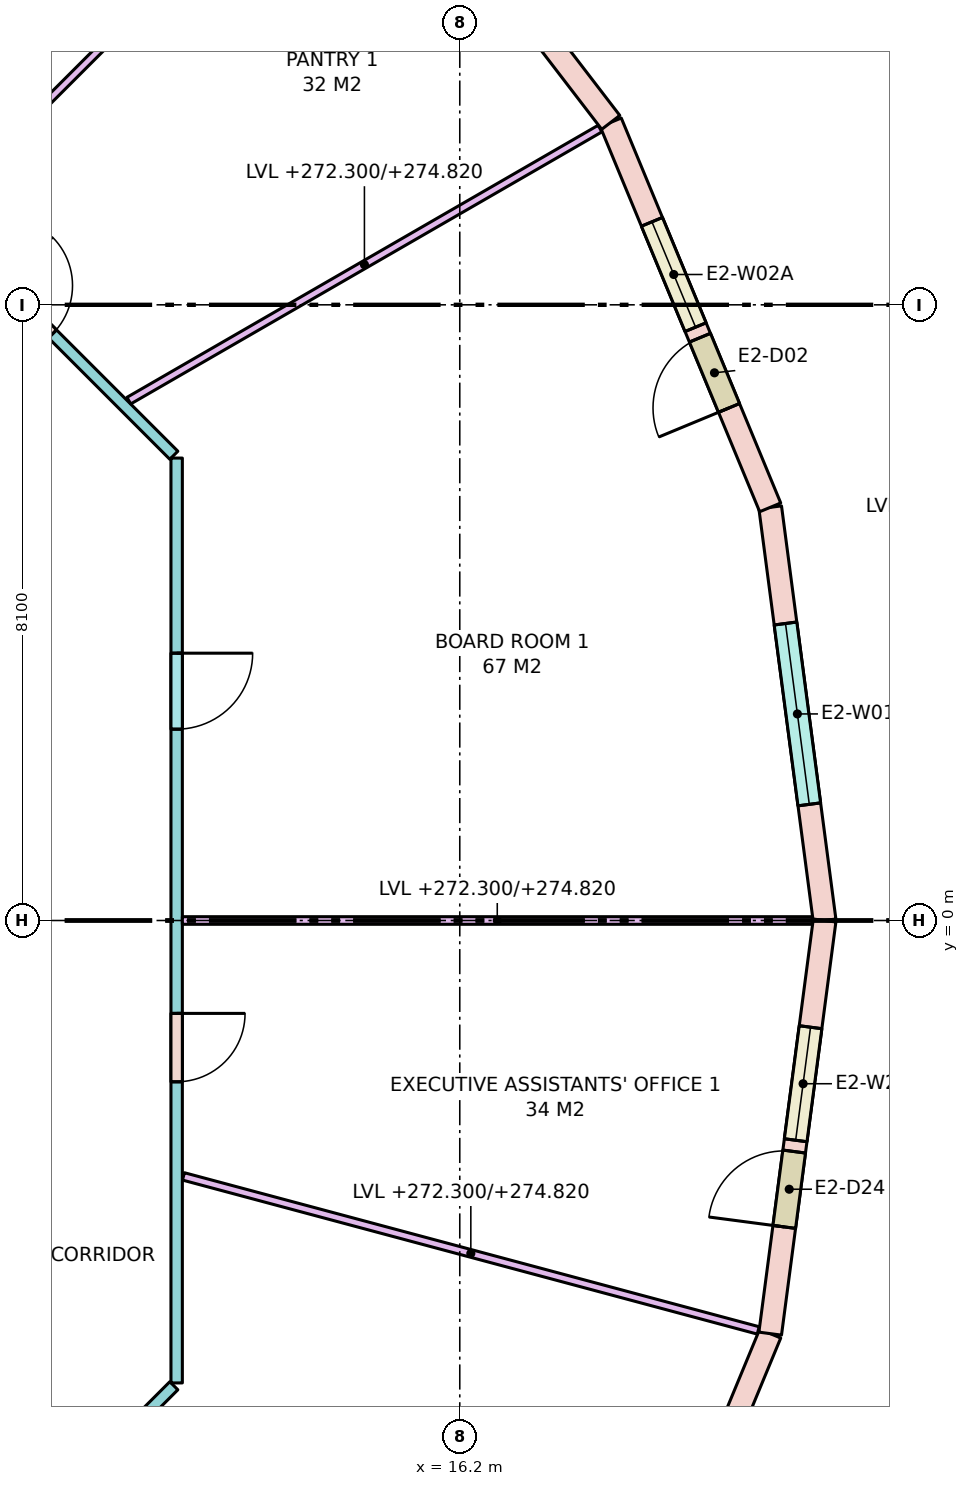
"""IFC4 building model, lengths in metres.
Left out: names, types, materials, properties, quantities, classifications, styles, units other than length and angle.
Written with IfcOpenShell. Run it as: python <this file> out.ifc"""

import sys

from ifc_helpers import new_model, si_unit, direction, frame, frame_2d, origin, place, context, subcontext, project, spatial, rectangle, extrude, element, fill, save


model = new_model("IFC4")
c1 = context("Model", 3, precision=1e-05, world=origin(), true_north=direction((0.0, 1.0)))
c2 = subcontext(c1, "Body", "Model", "MODEL_VIEW")
j1 = project(units=[si_unit("LENGTHUNIT", "METRE"), si_unit("PLANEANGLEUNIT", "RADIAN")], contexts=[c1])
p1 = place(None, origin())
s1 = spatial("IfcSite", under=j1, at=p1, CompositionType="ELEMENT")
p2 = place(p1, origin())
s2 = spatial("IfcBuilding", under=s1, at=p2, CompositionType="ELEMENT")
p3 = place(p2, frame((0.0, 0.0, 272.3)))
s3 = spatial("IfcBuildingStorey", under=s2, at=p3, CompositionType="ELEMENT", Elevation=272.3)
p4 = place(p3, frame((21.0, 0.0, 0.0), z_axis=(0.0, 0.0, 1.0), x_axis=(-0.130527087244, 0.991444743541, 0.0)))
e1 = element("IfcWall", 1, at=p4, inside=s3, PredefinedType="STANDARD", context=c2, shape_type="SweptSolid", body=[
    extrude(rectangle(XDim=5.482, YDim=0.3, at=frame_2d((2.741, 0.0))), origin(), (0.0, 0.0, 1.0), 3.42),
])
p5 = place(p4, frame((1.541, 0.0, 0.8)))
e2 = element("IfcOpeningElement", 2, at=p5, cuts=e1, PredefinedType="OPENING", context=c2, shape_type="SweptSolid", body=[
    extrude(rectangle(XDim=2.4, YDim=2.4, at=frame_2d((1.2, 1.2))), frame((0.0, 0.16, 0.0), z_axis=(0.0, -1.0, 0.0), x_axis=(1.0, 0.0, 0.0)), (0.0, 0.0, 1.0), 0.32),
])
p6 = place(p3, frame((20.284, 5.435, 0.0), z_axis=(0.0, 0.0, 1.0), x_axis=(-0.382688740813, 0.923877333662, 0.0)))
e3 = element("IfcWall", 3, at=p6, inside=s3, PredefinedType="STANDARD", context=c2, shape_type="SweptSolid", body=[
    extrude(rectangle(XDim=5.482, YDim=0.3, at=frame_2d((2.741, 0.0))), origin(), (0.0, 0.0, 1.0), 3.42),
])
p7 = place(p6, frame((1.416, 0.0, 0.0)))
e4 = element("IfcOpeningElement", 4, at=p7, cuts=e3, PredefinedType="OPENING", context=c2, shape_type="SweptSolid", body=[
    extrude(rectangle(XDim=1.0, YDim=2.4, at=frame_2d((0.5, 1.2))), frame((0.0, 0.16, 0.0), z_axis=(0.0, -1.0, 0.0), x_axis=(1.0, 0.0, 0.0)), (0.0, 0.0, 1.0), 0.32),
])
p8 = place(p6, frame((2.566, 0.0, 0.8)))
e5 = element("IfcOpeningElement", 5, at=p8, cuts=e3, PredefinedType="OPENING", context=c2, shape_type="SweptSolid", body=[
    extrude(rectangle(XDim=1.5, YDim=2.4, at=frame_2d((0.75, 1.2))), frame((0.0, 0.16, 0.0), z_axis=(0.0, -1.0, 0.0), x_axis=(1.0, 0.0, 0.0)), (0.0, 0.0, 1.0), 0.32),
])
p9 = place(p3, frame((18.187, 10.5, 0.0), z_axis=(0.0, 0.0, 1.0), x_axis=(-0.608784891166, 0.793335336593, 0.0)))
e6 = element("IfcWall", 6, at=p9, inside=s3, PredefinedType="STANDARD", context=c2, shape_type="SweptSolid", body=[
    extrude(rectangle(XDim=5.482, YDim=0.3, at=frame_2d((2.741, 0.0))), origin(), (0.0, 0.0, 1.0), 3.42),
])
p10 = place(p9, frame((1.541, 0.0, 0.8)))
e7 = element("IfcOpeningElement", 7, at=p10, cuts=e6, PredefinedType="OPENING", context=c2, shape_type="SweptSolid", body=[
    extrude(rectangle(XDim=2.4, YDim=2.4, at=frame_2d((1.2, 1.2))), frame((0.0, 0.16, 0.0), z_axis=(0.0, -1.0, 0.0), x_axis=(1.0, 0.0, 0.0)), (0.0, 0.0, 1.0), 0.32),
])
p11 = place(p3, frame((18.187, -10.5, 0.0), z_axis=(0.0, 0.0, 1.0), x_axis=(0.382688740813, 0.923877333662, 0.0)))
e8 = element("IfcWall", 8, at=p11, inside=s3, PredefinedType="STANDARD", context=c2, shape_type="SweptSolid", body=[
    extrude(rectangle(XDim=5.482, YDim=0.3, at=frame_2d((2.741, 0.0))), origin(), (0.0, 0.0, 1.0), 3.42),
])
p12 = place(p11, frame((1.541, 0.0, 0.8)))
e9 = element("IfcOpeningElement", 9, at=p12, cuts=e8, PredefinedType="OPENING", context=c2, shape_type="SweptSolid", body=[
    extrude(rectangle(XDim=2.4, YDim=2.4, at=frame_2d((1.2, 1.2))), frame((0.0, 0.16, 0.0), z_axis=(0.0, -1.0, 0.0), x_axis=(1.0, 0.0, 0.0)), (0.0, 0.0, 1.0), 0.32),
])
p13 = place(p3, frame((20.284, -5.435, 0.0), z_axis=(0.0, 0.0, 1.0), x_axis=(0.130527087244, 0.991444743541, 0.0)))
e10 = element("IfcWall", 10, at=p13, inside=s3, PredefinedType="STANDARD", context=c2, shape_type="SweptSolid", body=[
    extrude(rectangle(XDim=5.482, YDim=0.3, at=frame_2d((2.741, 0.0))), origin(), (0.0, 0.0, 1.0), 3.42),
])
p14 = place(p13, frame((1.416, 0.0, 0.0)))
e11 = element("IfcOpeningElement", 11, at=p14, cuts=e10, PredefinedType="OPENING", context=c2, shape_type="SweptSolid", body=[
    extrude(rectangle(XDim=1.0, YDim=2.4, at=frame_2d((0.5, 1.2))), frame((0.0, 0.16, 0.0), z_axis=(0.0, -1.0, 0.0), x_axis=(1.0, 0.0, 0.0)), (0.0, 0.0, 1.0), 0.32),
])
p15 = place(p13, frame((2.566, 0.0, 0.8)))
e12 = element("IfcOpeningElement", 12, at=p15, cuts=e10, PredefinedType="OPENING", context=c2, shape_type="SweptSolid", body=[
    extrude(rectangle(XDim=1.5, YDim=2.4, at=frame_2d((0.75, 1.2))), frame((0.0, 0.16, 0.0), z_axis=(0.0, -1.0, 0.0), x_axis=(1.0, 0.0, 0.0)), (0.0, 0.0, 1.0), 0.32),
])
p16 = place(p3, frame((12.438, -6.121, 0.0), z_axis=(0.0, 0.0, 1.0), x_axis=(-0.707106781187, -0.707106781187, 0.0)))
e13 = element("IfcWall", 13, at=p16, inside=s3, PredefinedType="PARTITIONING", context=c2, shape_type="SweptSolid", body=[
    extrude(rectangle(XDim=6.105, YDim=0.15, at=frame_2d((3.053, 0.0))), origin(), (0.0, 0.0, 1.0), 2.52),
])
p17 = place(p16, frame((1.758, 0.0, 0.0)))
e14 = element("IfcOpeningElement", 14, at=p17, cuts=e13, PredefinedType="OPENING", context=c2, shape_type="SweptSolid", body=[
    extrude(rectangle(XDim=1.0, YDim=2.1, at=frame_2d((0.5, 1.05))), frame((0.0, 0.085, 0.0), z_axis=(0.0, -1.0, 0.0), x_axis=(1.0, 0.0, 0.0)), (0.0, 0.0, 1.0), 0.17),
])
p18 = place(p3, frame((8.121, 10.438, 0.0), z_axis=(0.0, 0.0, 1.0), x_axis=(0.707106781187, -0.707106781187, 0.0)))
e15 = element("IfcWall", 15, at=p18, inside=s3, PredefinedType="PARTITIONING", context=c2, shape_type="SweptSolid", body=[
    extrude(rectangle(XDim=6.105, YDim=0.15, at=frame_2d((3.053, 0.0))), origin(), (0.0, 0.0, 1.0), 2.52),
])
p19 = place(p18, frame((2.948, 0.0, 0.0)))
e16 = element("IfcOpeningElement", 16, at=p19, cuts=e15, PredefinedType="OPENING", context=c2, shape_type="SweptSolid", body=[
    extrude(rectangle(XDim=0.9, YDim=2.1, at=frame_2d((0.45, 1.05))), frame((0.0, 0.085, 0.0), z_axis=(0.0, -1.0, 0.0), x_axis=(1.0, 0.0, 0.0)), (0.0, 0.0, 1.0), 0.17),
])
p20 = place(p3, frame((12.475, 6.084, 0.0), z_axis=(0.0, 0.0, 1.0), x_axis=(0.0, -1.0, 0.0)))
e17 = element("IfcWall", 17, at=p20, inside=s3, PredefinedType="PARTITIONING", context=c2, shape_type="SweptSolid", body=[
    extrude(rectangle(XDim=12.167, YDim=0.15, at=frame_2d((6.084, 0.0))), origin(), (0.0, 0.0, 1.0), 2.52),
])
p21 = place(p20, frame((7.306, 0.0, 0.0)))
e18 = element("IfcOpeningElement", 18, at=p21, cuts=e17, PredefinedType="OPENING", context=c2, shape_type="SweptSolid", body=[
    extrude(rectangle(XDim=0.9, YDim=2.1, at=frame_2d((0.45, 1.05))), frame((0.0, 0.085, 0.0), z_axis=(0.0, -1.0, 0.0), x_axis=(1.0, 0.0, 0.0)), (0.0, 0.0, 1.0), 0.17),
])
p22 = place(p20, frame((2.567, 0.0, 0.0)))
e19 = element("IfcOpeningElement", 19, at=p22, cuts=e17, PredefinedType="OPENING", context=c2, shape_type="SweptSolid", body=[
    extrude(rectangle(XDim=1.0, YDim=2.1, at=frame_2d((0.5, 1.05))), frame((0.0, 0.085, 0.0), z_axis=(0.0, -1.0, 0.0), x_axis=(1.0, 0.0, 0.0)), (0.0, 0.0, 1.0), 0.17),
])
p23 = place(p3, frame((12.55, 0.0, 0.0), z_axis=(0.0, 0.0, 1.0), x_axis=(1.0, 0.0, 0.0)))
e20 = element("IfcWall", 20, at=p23, inside=s3, PredefinedType="PARTITIONING", context=c2, shape_type="SweptSolid", body=[
    extrude(rectangle(XDim=8.287, YDim=0.1, at=frame_2d((4.143, 0.0))), origin(), (0.0, 0.0, 1.0), 2.52),
])
p24 = place(p3, frame((11.846, 6.839, 0.0), z_axis=(0.0, 0.0, 1.0), x_axis=(0.866011787705, 0.500023583, 0.0)))
e21 = element("IfcWall", 21, at=p24, inside=s3, PredefinedType="PARTITIONING", context=c2, shape_type="SweptSolid", body=[
    extrude(rectangle(XDim=7.158, YDim=0.1, at=frame_2d((3.579, 0.0))), origin(), (0.0, 0.0, 1.0), 2.52),
])
p25 = place(p3, frame((9.333, 9.333, 0.0), z_axis=(0.0, 0.0, 1.0), x_axis=(0.707106781187, 0.707106781187, 0.0)))
e22 = element("IfcWall", 22, at=p25, inside=s3, PredefinedType="PARTITIONING", context=c2, shape_type="SweptSolid", body=[
    extrude(rectangle(XDim=7.639, YDim=0.1, at=frame_2d((3.819, 0.0))), origin(), (0.0, 0.0, 1.0), 2.52),
])
p26 = place(p3, frame((12.564, -3.367, 0.0), z_axis=(0.0, 0.0, 1.0), x_axis=(0.965933576344, -0.258790119773, 0.0)))
e23 = element("IfcWall", 23, at=p26, inside=s3, PredefinedType="PARTITIONING", context=c2, shape_type="SweptSolid", body=[
    extrude(rectangle(XDim=7.829, YDim=0.1, at=frame_2d((3.915, 0.0))), origin(), (0.0, 0.0, 1.0), 2.52),
])
p27 = place(p5, origin())
e24 = element("IfcWindow", 24, at=p27, inside=s3, PartitioningType="SINGLE_PANEL", PredefinedType="WINDOW", context=c2, shape_type="SweptSolid", body=[
    extrude(rectangle(XDim=2.4, YDim=2.4, at=frame_2d((1.2, 1.2))), frame((0.0, 0.03, 0.0), z_axis=(0.0, -1.0, 0.0), x_axis=(1.0, 0.0, 0.0)), (0.0, 0.0, 1.0), 0.06),
])
fill(e2, e24)
p28 = place(p7, origin())
e25 = element("IfcDoor", 25, at=p28, inside=s3, OperationType="SINGLE_SWING_LEFT", PredefinedType="DOOR", context=c2, shape_type="SweptSolid", body=[
    extrude(rectangle(XDim=1.0, YDim=2.4, at=frame_2d((0.5, 1.2))), frame((0.0, 0.025, 0.0), z_axis=(0.0, -1.0, 0.0), x_axis=(1.0, 0.0, 0.0)), (0.0, 0.0, 1.0), 0.05),
])
fill(e4, e25)
p29 = place(p8, origin())
e26 = element("IfcWindow", 26, at=p29, inside=s3, PartitioningType="SINGLE_PANEL", PredefinedType="WINDOW", context=c2, shape_type="SweptSolid", body=[
    extrude(rectangle(XDim=1.5, YDim=2.4, at=frame_2d((0.75, 1.2))), frame((0.0, 0.03, 0.0), z_axis=(0.0, -1.0, 0.0), x_axis=(1.0, 0.0, 0.0)), (0.0, 0.0, 1.0), 0.06),
])
fill(e5, e26)
p30 = place(p14, origin())
e27 = element("IfcDoor", 27, at=p30, inside=s3, OperationType="SINGLE_SWING_LEFT", PredefinedType="DOOR", context=c2, shape_type="SweptSolid", body=[
    extrude(rectangle(XDim=1.0, YDim=2.4, at=frame_2d((0.5, 1.2))), frame((0.0, 0.025, 0.0), z_axis=(0.0, -1.0, 0.0), x_axis=(1.0, 0.0, 0.0)), (0.0, 0.0, 1.0), 0.05),
])
fill(e11, e27)
p31 = place(p15, origin())
e28 = element("IfcWindow", 28, at=p31, inside=s3, PartitioningType="SINGLE_PANEL", PredefinedType="WINDOW", context=c2, shape_type="SweptSolid", body=[
    extrude(rectangle(XDim=1.5, YDim=2.4, at=frame_2d((0.75, 1.2))), frame((0.0, 0.03, 0.0), z_axis=(0.0, -1.0, 0.0), x_axis=(1.0, 0.0, 0.0)), (0.0, 0.0, 1.0), 0.06),
])
fill(e12, e28)
p32 = place(p21, origin())
e29 = element("IfcDoor", 29, at=p32, inside=s3, OperationType="SINGLE_SWING_LEFT", PredefinedType="DOOR", context=c2, shape_type="SweptSolid", body=[
    extrude(rectangle(XDim=0.9, YDim=2.1, at=frame_2d((0.45, 1.05))), frame((0.0, 0.025, 0.0), z_axis=(0.0, -1.0, 0.0), x_axis=(1.0, 0.0, 0.0)), (0.0, 0.0, 1.0), 0.05),
])
fill(e18, e29)
p33 = place(p22, origin())
e30 = element("IfcDoor", 30, at=p33, inside=s3, OperationType="SINGLE_SWING_LEFT", PredefinedType="DOOR", context=c2, shape_type="SweptSolid", body=[
    extrude(rectangle(XDim=1.0, YDim=2.1, at=frame_2d((0.5, 1.05))), frame((0.0, 0.025, 0.0), z_axis=(0.0, -1.0, 0.0), x_axis=(1.0, 0.0, 0.0)), (0.0, 0.0, 1.0), 0.05),
])
fill(e19, e30)
p34 = place(p19, origin())
e31 = element("IfcDoor", 31, at=p34, inside=s3, OperationType="SINGLE_SWING_LEFT", PredefinedType="DOOR", context=c2, shape_type="SweptSolid", body=[
    extrude(rectangle(XDim=0.9, YDim=2.1, at=frame_2d((0.45, 1.05))), frame((0.0, 0.025, 0.0), z_axis=(0.0, -1.0, 0.0), x_axis=(1.0, 0.0, 0.0)), (0.0, 0.0, 1.0), 0.05),
])
fill(e16, e31)
save(model, sys.argv[1])
